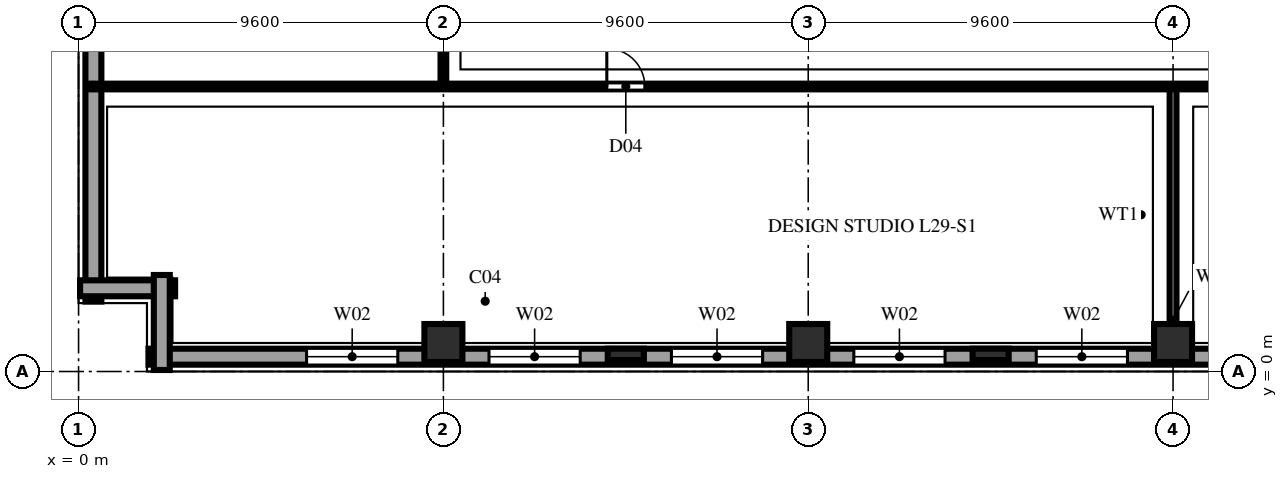
"""IFC4 building model, lengths in metres.
Left out: names, types, materials, properties, quantities, classifications, styles, units other than length and angle.
Written with IfcOpenShell. Run it as: python <this file> out.ifc"""

import sys

from ifc_helpers import new_model, si_unit, direction, frame, frame_2d, origin, origin_2d, place, context, subcontext, project, spatial, rectangle, extrude, element, fill, save


model = new_model("IFC4")
c1 = context("Model", 3, precision=1e-05, world=origin(), true_north=direction((0.0, 1.0)))
c2 = subcontext(c1, "Body", "Model", "MODEL_VIEW")
j1 = project(units=[si_unit("LENGTHUNIT", "METRE"), si_unit("PLANEANGLEUNIT", "RADIAN")], contexts=[c1])
p1 = place(None, origin())
s1 = spatial("IfcSite", under=j1, at=p1, CompositionType="ELEMENT")
p2 = place(p1, origin())
s2 = spatial("IfcBuilding", under=s1, at=p2, CompositionType="ELEMENT")
p3 = place(p2, frame((0.0, 0.0, 116.6)))
s3 = spatial("IfcBuildingStorey", under=s2, at=p3, CompositionType="ELEMENT", Elevation=116.6)
for number, where, z_axis, x_axis in (
    (1, (9.6, 0.75, 0.0), (0.0, 0.0, 1.0), (1.0, 0.0, 0.0)),
    (2, (19.2, 0.75, 0.0), (0.0, 0.0, 1.0), (1.0, 0.0, 0.0)),
    (3, (28.8, 0.75, 0.0), (0.0, 0.0, 1.0), (1.0, 0.0, 0.0)),
):
    element("IfcColumn", number, at=place(p3, frame(where, z_axis=z_axis, x_axis=x_axis)), inside=s3, PredefinedType="COLUMN", context=c2, shape_type="SweptSolid", body=[
        extrude(rectangle(XDim=1.0, YDim=1.0, at=origin_2d()), origin(), (0.0, 0.0, 1.0), 3.8),
    ])
for number, where, z_axis, x_axis in (
    (4, (14.4, 0.45, 0.0), (0.0, 0.0, 1.0), (1.0, 0.0, 0.0)),
    (5, (24.0, 0.45, 0.0), (0.0, 0.0, 1.0), (1.0, 0.0, 0.0)),
):
    element("IfcColumn", number, at=place(p3, frame(where, z_axis=z_axis, x_axis=x_axis)), inside=s3, PredefinedType="PILASTER", context=c2, shape_type="SweptSolid", body=[
        extrude(rectangle(XDim=0.95, YDim=0.3, at=origin_2d()), origin(), (0.0, 0.0, 1.0), 3.8),
    ])
p4 = place(p3, frame((1.84, 0.39, 0.0), z_axis=(0.0, 0.0, 1.0), x_axis=(1.0, 0.0, 0.0)))
e6 = element("IfcWall", 6, at=p4, inside=s3, PredefinedType="SOLIDWALL", context=c2, shape_type="SweptSolid", body=[
    extrude(rectangle(XDim=53.92, YDim=0.42, at=frame_2d((26.96, 0.0))), origin(), (0.0, 0.0, 1.0), 3.54),
])
p5 = place(p4, frame((4.16, 0.0, 0.85)))
e7 = element("IfcOpeningElement", 7, at=p5, cuts=e6, PredefinedType="OPENING", context=c2, shape_type="SweptSolid", body=[
    extrude(rectangle(XDim=2.4, YDim=1.85, at=frame_2d((1.2, 0.925))), frame((0.0, 0.222, 0.0), z_axis=(0.0, -1.0, 0.0), x_axis=(1.0, 0.0, 0.0)), (0.0, 0.0, 1.0), 0.444),
])
p6 = place(p4, frame((8.96, 0.0, 0.85)))
e8 = element("IfcOpeningElement", 8, at=p6, cuts=e6, PredefinedType="OPENING", context=c2, shape_type="SweptSolid", body=[
    extrude(rectangle(XDim=2.4, YDim=1.85, at=frame_2d((1.2, 0.925))), frame((0.0, 0.222, 0.0), z_axis=(0.0, -1.0, 0.0), x_axis=(1.0, 0.0, 0.0)), (0.0, 0.0, 1.0), 0.444),
])
p7 = place(p4, frame((13.76, 0.0, 0.85)))
e9 = element("IfcOpeningElement", 9, at=p7, cuts=e6, PredefinedType="OPENING", context=c2, shape_type="SweptSolid", body=[
    extrude(rectangle(XDim=2.4, YDim=1.85, at=frame_2d((1.2, 0.925))), frame((0.0, 0.222, 0.0), z_axis=(0.0, -1.0, 0.0), x_axis=(1.0, 0.0, 0.0)), (0.0, 0.0, 1.0), 0.444),
])
p8 = place(p4, frame((18.56, 0.0, 0.85)))
e10 = element("IfcOpeningElement", 10, at=p8, cuts=e6, PredefinedType="OPENING", context=c2, shape_type="SweptSolid", body=[
    extrude(rectangle(XDim=2.4, YDim=1.85, at=frame_2d((1.2, 0.925))), frame((0.0, 0.222, 0.0), z_axis=(0.0, -1.0, 0.0), x_axis=(1.0, 0.0, 0.0)), (0.0, 0.0, 1.0), 0.444),
])
p9 = place(p4, frame((23.36, 0.0, 0.85)))
e11 = element("IfcOpeningElement", 11, at=p9, cuts=e6, PredefinedType="OPENING", context=c2, shape_type="SweptSolid", body=[
    extrude(rectangle(XDim=2.4, YDim=1.85, at=frame_2d((1.2, 0.925))), frame((0.0, 0.222, 0.0), z_axis=(0.0, -1.0, 0.0), x_axis=(1.0, 0.0, 0.0)), (0.0, 0.0, 1.0), 0.444),
])
p10 = place(p4, frame((28.16, 0.0, 0.85)))
e12 = element("IfcOpeningElement", 12, at=p10, cuts=e6, PredefinedType="OPENING", context=c2, shape_type="SweptSolid", body=[
    extrude(rectangle(XDim=2.4, YDim=1.85, at=frame_2d((1.2, 0.925))), frame((0.0, 0.222, 0.0), z_axis=(0.0, -1.0, 0.0), x_axis=(1.0, 0.0, 0.0)), (0.0, 0.0, 1.0), 0.444),
])
p11 = place(p3, frame((0.39, 65.36, 0.0), z_axis=(0.0, 0.0, 1.0), x_axis=(0.0, -1.0, 0.0)))
e13 = element("IfcWall", 13, at=p11, inside=s3, PredefinedType="SOLIDWALL", context=c2, shape_type="SweptSolid", body=[
    extrude(rectangle(XDim=63.52, YDim=0.42, at=frame_2d((31.76, 0.0))), origin(), (0.0, 0.0, 1.0), 3.54),
])
p12 = place(p11, frame((4.885, 0.0, 0.9)))
e14 = element("IfcOpeningElement", 14, at=p12, cuts=e13, PredefinedType="OPENING", context=c2, shape_type="SweptSolid", body=[
    extrude(rectangle(XDim=0.95, YDim=1.85, at=frame_2d((0.475, 0.925))), frame((0.0, 0.222, 0.0), z_axis=(0.0, -1.0, 0.0), x_axis=(1.0, 0.0, 0.0)), (0.0, 0.0, 1.0), 0.444),
])
p13 = place(p11, frame((9.41, 0.0, 0.9)))
e15 = element("IfcOpeningElement", 15, at=p13, cuts=e13, PredefinedType="OPENING", context=c2, shape_type="SweptSolid", body=[
    extrude(rectangle(XDim=1.5, YDim=1.85, at=frame_2d((0.75, 0.925))), frame((0.0, 0.222, 0.0), z_axis=(0.0, -1.0, 0.0), x_axis=(1.0, 0.0, 0.0)), (0.0, 0.0, 1.0), 0.444),
])
p14 = place(p11, frame((14.485, 0.0, 0.9)))
e16 = element("IfcOpeningElement", 16, at=p14, cuts=e13, PredefinedType="OPENING", context=c2, shape_type="SweptSolid", body=[
    extrude(rectangle(XDim=0.95, YDim=1.85, at=frame_2d((0.475, 0.925))), frame((0.0, 0.222, 0.0), z_axis=(0.0, -1.0, 0.0), x_axis=(1.0, 0.0, 0.0)), (0.0, 0.0, 1.0), 0.444),
])
p15 = place(p11, frame((19.01, 0.0, 0.9)))
e17 = element("IfcOpeningElement", 17, at=p15, cuts=e13, PredefinedType="OPENING", context=c2, shape_type="SweptSolid", body=[
    extrude(rectangle(XDim=1.5, YDim=1.85, at=frame_2d((0.75, 0.925))), frame((0.0, 0.222, 0.0), z_axis=(0.0, -1.0, 0.0), x_axis=(1.0, 0.0, 0.0)), (0.0, 0.0, 1.0), 0.444),
])
p16 = place(p11, frame((24.085, 0.0, 0.9)))
e18 = element("IfcOpeningElement", 18, at=p16, cuts=e13, PredefinedType="OPENING", context=c2, shape_type="SweptSolid", body=[
    extrude(rectangle(XDim=0.95, YDim=1.85, at=frame_2d((0.475, 0.925))), frame((0.0, 0.222, 0.0), z_axis=(0.0, -1.0, 0.0), x_axis=(1.0, 0.0, 0.0)), (0.0, 0.0, 1.0), 0.444),
])
p17 = place(p11, frame((28.61, 0.0, 0.9)))
e19 = element("IfcOpeningElement", 19, at=p17, cuts=e13, PredefinedType="OPENING", context=c2, shape_type="SweptSolid", body=[
    extrude(rectangle(XDim=1.5, YDim=1.85, at=frame_2d((0.75, 0.925))), frame((0.0, 0.222, 0.0), z_axis=(0.0, -1.0, 0.0), x_axis=(1.0, 0.0, 0.0)), (0.0, 0.0, 1.0), 0.444),
])
p18 = place(p11, frame((33.685, 0.0, 0.9)))
e20 = element("IfcOpeningElement", 20, at=p18, cuts=e13, PredefinedType="OPENING", context=c2, shape_type="SweptSolid", body=[
    extrude(rectangle(XDim=0.95, YDim=1.85, at=frame_2d((0.475, 0.925))), frame((0.0, 0.222, 0.0), z_axis=(0.0, -1.0, 0.0), x_axis=(1.0, 0.0, 0.0)), (0.0, 0.0, 1.0), 0.444),
])
p19 = place(p11, frame((38.21, 0.0, 0.9)))
e21 = element("IfcOpeningElement", 21, at=p19, cuts=e13, PredefinedType="OPENING", context=c2, shape_type="SweptSolid", body=[
    extrude(rectangle(XDim=1.5, YDim=1.85, at=frame_2d((0.75, 0.925))), frame((0.0, 0.222, 0.0), z_axis=(0.0, -1.0, 0.0), x_axis=(1.0, 0.0, 0.0)), (0.0, 0.0, 1.0), 0.444),
])
p20 = place(p11, frame((43.285, 0.0, 0.9)))
e22 = element("IfcOpeningElement", 22, at=p20, cuts=e13, PredefinedType="OPENING", context=c2, shape_type="SweptSolid", body=[
    extrude(rectangle(XDim=0.95, YDim=1.85, at=frame_2d((0.475, 0.925))), frame((0.0, 0.222, 0.0), z_axis=(0.0, -1.0, 0.0), x_axis=(1.0, 0.0, 0.0)), (0.0, 0.0, 1.0), 0.444),
])
p21 = place(p11, frame((47.81, 0.0, 0.9)))
e23 = element("IfcOpeningElement", 23, at=p21, cuts=e13, PredefinedType="OPENING", context=c2, shape_type="SweptSolid", body=[
    extrude(rectangle(XDim=1.5, YDim=1.85, at=frame_2d((0.75, 0.925))), frame((0.0, 0.222, 0.0), z_axis=(0.0, -1.0, 0.0), x_axis=(1.0, 0.0, 0.0)), (0.0, 0.0, 1.0), 0.444),
])
p22 = place(p11, frame((52.885, 0.0, 0.9)))
e24 = element("IfcOpeningElement", 24, at=p22, cuts=e13, PredefinedType="OPENING", context=c2, shape_type="SweptSolid", body=[
    extrude(rectangle(XDim=0.95, YDim=1.85, at=frame_2d((0.475, 0.925))), frame((0.0, 0.222, 0.0), z_axis=(0.0, -1.0, 0.0), x_axis=(1.0, 0.0, 0.0)), (0.0, 0.0, 1.0), 0.444),
])
for number, where, z_axis, x_axis in (
    (25, (0.04, 2.19, 0.0), (0.0, 0.0, 1.0), (1.0, 0.0, 0.0)),
    (26, (2.19, 2.54, 0.0), (0.0, 0.0, 1.0), (0.0, -1.0, 0.0)),
):
    element("IfcWall", number, at=place(p3, frame(where, z_axis=z_axis, x_axis=x_axis)), inside=s3, PredefinedType="SOLIDWALL", context=c2, shape_type="SweptSolid", body=[
        extrude(rectangle(XDim=2.5, YDim=0.42, at=frame_2d((1.25, 0.0))), origin(), (0.0, 0.0, 1.0), 3.54),
    ])
p23 = place(p3, frame((9.6, 7.5, 0.0), z_axis=(0.0, 0.0, 1.0), x_axis=(0.0, 1.0, 0.0)))
e27 = element("IfcWall", 27, at=p23, inside=s3, PredefinedType="PARTITIONING", context=c2, shape_type="SweptSolid", body=[
    extrude(rectangle(XDim=2.1, YDim=0.15, at=frame_2d((1.05, 0.0))), origin(), (0.0, 0.0, 1.0), 2.923),
])
p24 = place(p3, frame((28.8, 0.22, 0.0), z_axis=(0.0, 0.0, 1.0), x_axis=(0.0, 1.0, 0.0)))
e28 = element("IfcWall", 28, at=p24, inside=s3, PredefinedType="PARTITIONING", context=c2, shape_type="SweptSolid", body=[
    extrude(rectangle(XDim=0.53, YDim=0.18, at=frame_2d((0.265, 0.0))), origin(), (0.0, 0.0, 1.0), 3.54),
])
p25 = place(p3, frame((28.8, 0.75, 0.0), z_axis=(0.0, 0.0, 1.0), x_axis=(0.0, 1.0, 0.0)))
e29 = element("IfcWall", 29, at=p25, inside=s3, PredefinedType="PARTITIONING", context=c2, shape_type="SweptSolid", body=[
    extrude(rectangle(XDim=6.75, YDim=0.18, at=frame_2d((3.375, 0.0))), origin(), (0.0, 0.0, 1.0), 2.923),
])
p26 = place(p3, frame((0.22, 7.5, 0.0), z_axis=(0.0, 0.0, 1.0), x_axis=(1.0, 0.0, 0.0)))
e30 = element("IfcWall", 30, at=p26, inside=s3, PredefinedType="PARTITIONING", context=c2, shape_type="SweptSolid", body=[
    extrude(rectangle(XDim=47.78, YDim=0.15, at=frame_2d((23.89, 0.0))), origin(), (0.0, 0.0, 1.0), 3.54),
])
p27 = place(p26, frame((13.68, 0.0, 0.0)))
e31 = element("IfcOpeningElement", 31, at=p27, cuts=e30, PredefinedType="OPENING", context=c2, shape_type="SweptSolid", body=[
    extrude(rectangle(XDim=1.0, YDim=2.2, at=frame_2d((0.5, 1.1))), frame((0.0, 0.087, 0.0), z_axis=(0.0, -1.0, 0.0), x_axis=(1.0, 0.0, 0.0)), (0.0, 0.0, 1.0), 0.174),
])
p28 = place(p26, frame((41.63, 0.0, 0.0)))
e32 = element("IfcOpeningElement", 32, at=p28, cuts=e30, PredefinedType="OPENING", context=c2, shape_type="SweptSolid", body=[
    extrude(rectangle(XDim=1.0, YDim=2.2, at=frame_2d((0.5, 1.1))), frame((0.0, 0.087, 0.0), z_axis=(0.0, -1.0, 0.0), x_axis=(1.0, 0.0, 0.0)), (0.0, 0.0, 1.0), 0.174),
])
p29 = place(p5, origin())
e33 = element("IfcWindow", 33, at=p29, inside=s3, PartitioningType="TRIPLE_PANEL_VERTICAL", PredefinedType="WINDOW", context=c2, shape_type="SweptSolid", body=[
    extrude(rectangle(XDim=2.4, YDim=1.85, at=frame_2d((1.2, 0.925))), frame((0.0, 0.11, 0.0), z_axis=(0.0, -1.0, 0.0), x_axis=(1.0, 0.0, 0.0)), (0.0, 0.0, 1.0), 0.06),
])
fill(e7, e33)
p30 = place(p6, origin())
e34 = element("IfcWindow", 34, at=p30, inside=s3, PartitioningType="TRIPLE_PANEL_VERTICAL", PredefinedType="WINDOW", context=c2, shape_type="SweptSolid", body=[
    extrude(rectangle(XDim=2.4, YDim=1.85, at=frame_2d((1.2, 0.925))), frame((0.0, 0.11, 0.0), z_axis=(0.0, -1.0, 0.0), x_axis=(1.0, 0.0, 0.0)), (0.0, 0.0, 1.0), 0.06),
])
fill(e8, e34)
p31 = place(p7, origin())
e35 = element("IfcWindow", 35, at=p31, inside=s3, PartitioningType="TRIPLE_PANEL_VERTICAL", PredefinedType="WINDOW", context=c2, shape_type="SweptSolid", body=[
    extrude(rectangle(XDim=2.4, YDim=1.85, at=frame_2d((1.2, 0.925))), frame((0.0, 0.11, 0.0), z_axis=(0.0, -1.0, 0.0), x_axis=(1.0, 0.0, 0.0)), (0.0, 0.0, 1.0), 0.06),
])
fill(e9, e35)
p32 = place(p8, origin())
e36 = element("IfcWindow", 36, at=p32, inside=s3, PartitioningType="TRIPLE_PANEL_VERTICAL", PredefinedType="WINDOW", context=c2, shape_type="SweptSolid", body=[
    extrude(rectangle(XDim=2.4, YDim=1.85, at=frame_2d((1.2, 0.925))), frame((0.0, 0.11, 0.0), z_axis=(0.0, -1.0, 0.0), x_axis=(1.0, 0.0, 0.0)), (0.0, 0.0, 1.0), 0.06),
])
fill(e10, e36)
p33 = place(p9, origin())
e37 = element("IfcWindow", 37, at=p33, inside=s3, PartitioningType="TRIPLE_PANEL_VERTICAL", PredefinedType="WINDOW", context=c2, shape_type="SweptSolid", body=[
    extrude(rectangle(XDim=2.4, YDim=1.85, at=frame_2d((1.2, 0.925))), frame((0.0, 0.11, 0.0), z_axis=(0.0, -1.0, 0.0), x_axis=(1.0, 0.0, 0.0)), (0.0, 0.0, 1.0), 0.06),
])
fill(e11, e37)
p34 = place(p27, origin())
e38 = element("IfcDoor", 38, at=p34, inside=s3, OperationType="SINGLE_SWING_LEFT", PredefinedType="DOOR", context=c2, shape_type="SweptSolid", body=[
    extrude(rectangle(XDim=1.0, YDim=2.2, at=frame_2d((0.5, 1.1))), frame((0.0, 0.025, 0.0), z_axis=(0.0, -1.0, 0.0), x_axis=(1.0, 0.0, 0.0)), (0.0, 0.0, 1.0), 0.05),
])
fill(e31, e38)
save(model, sys.argv[1])
